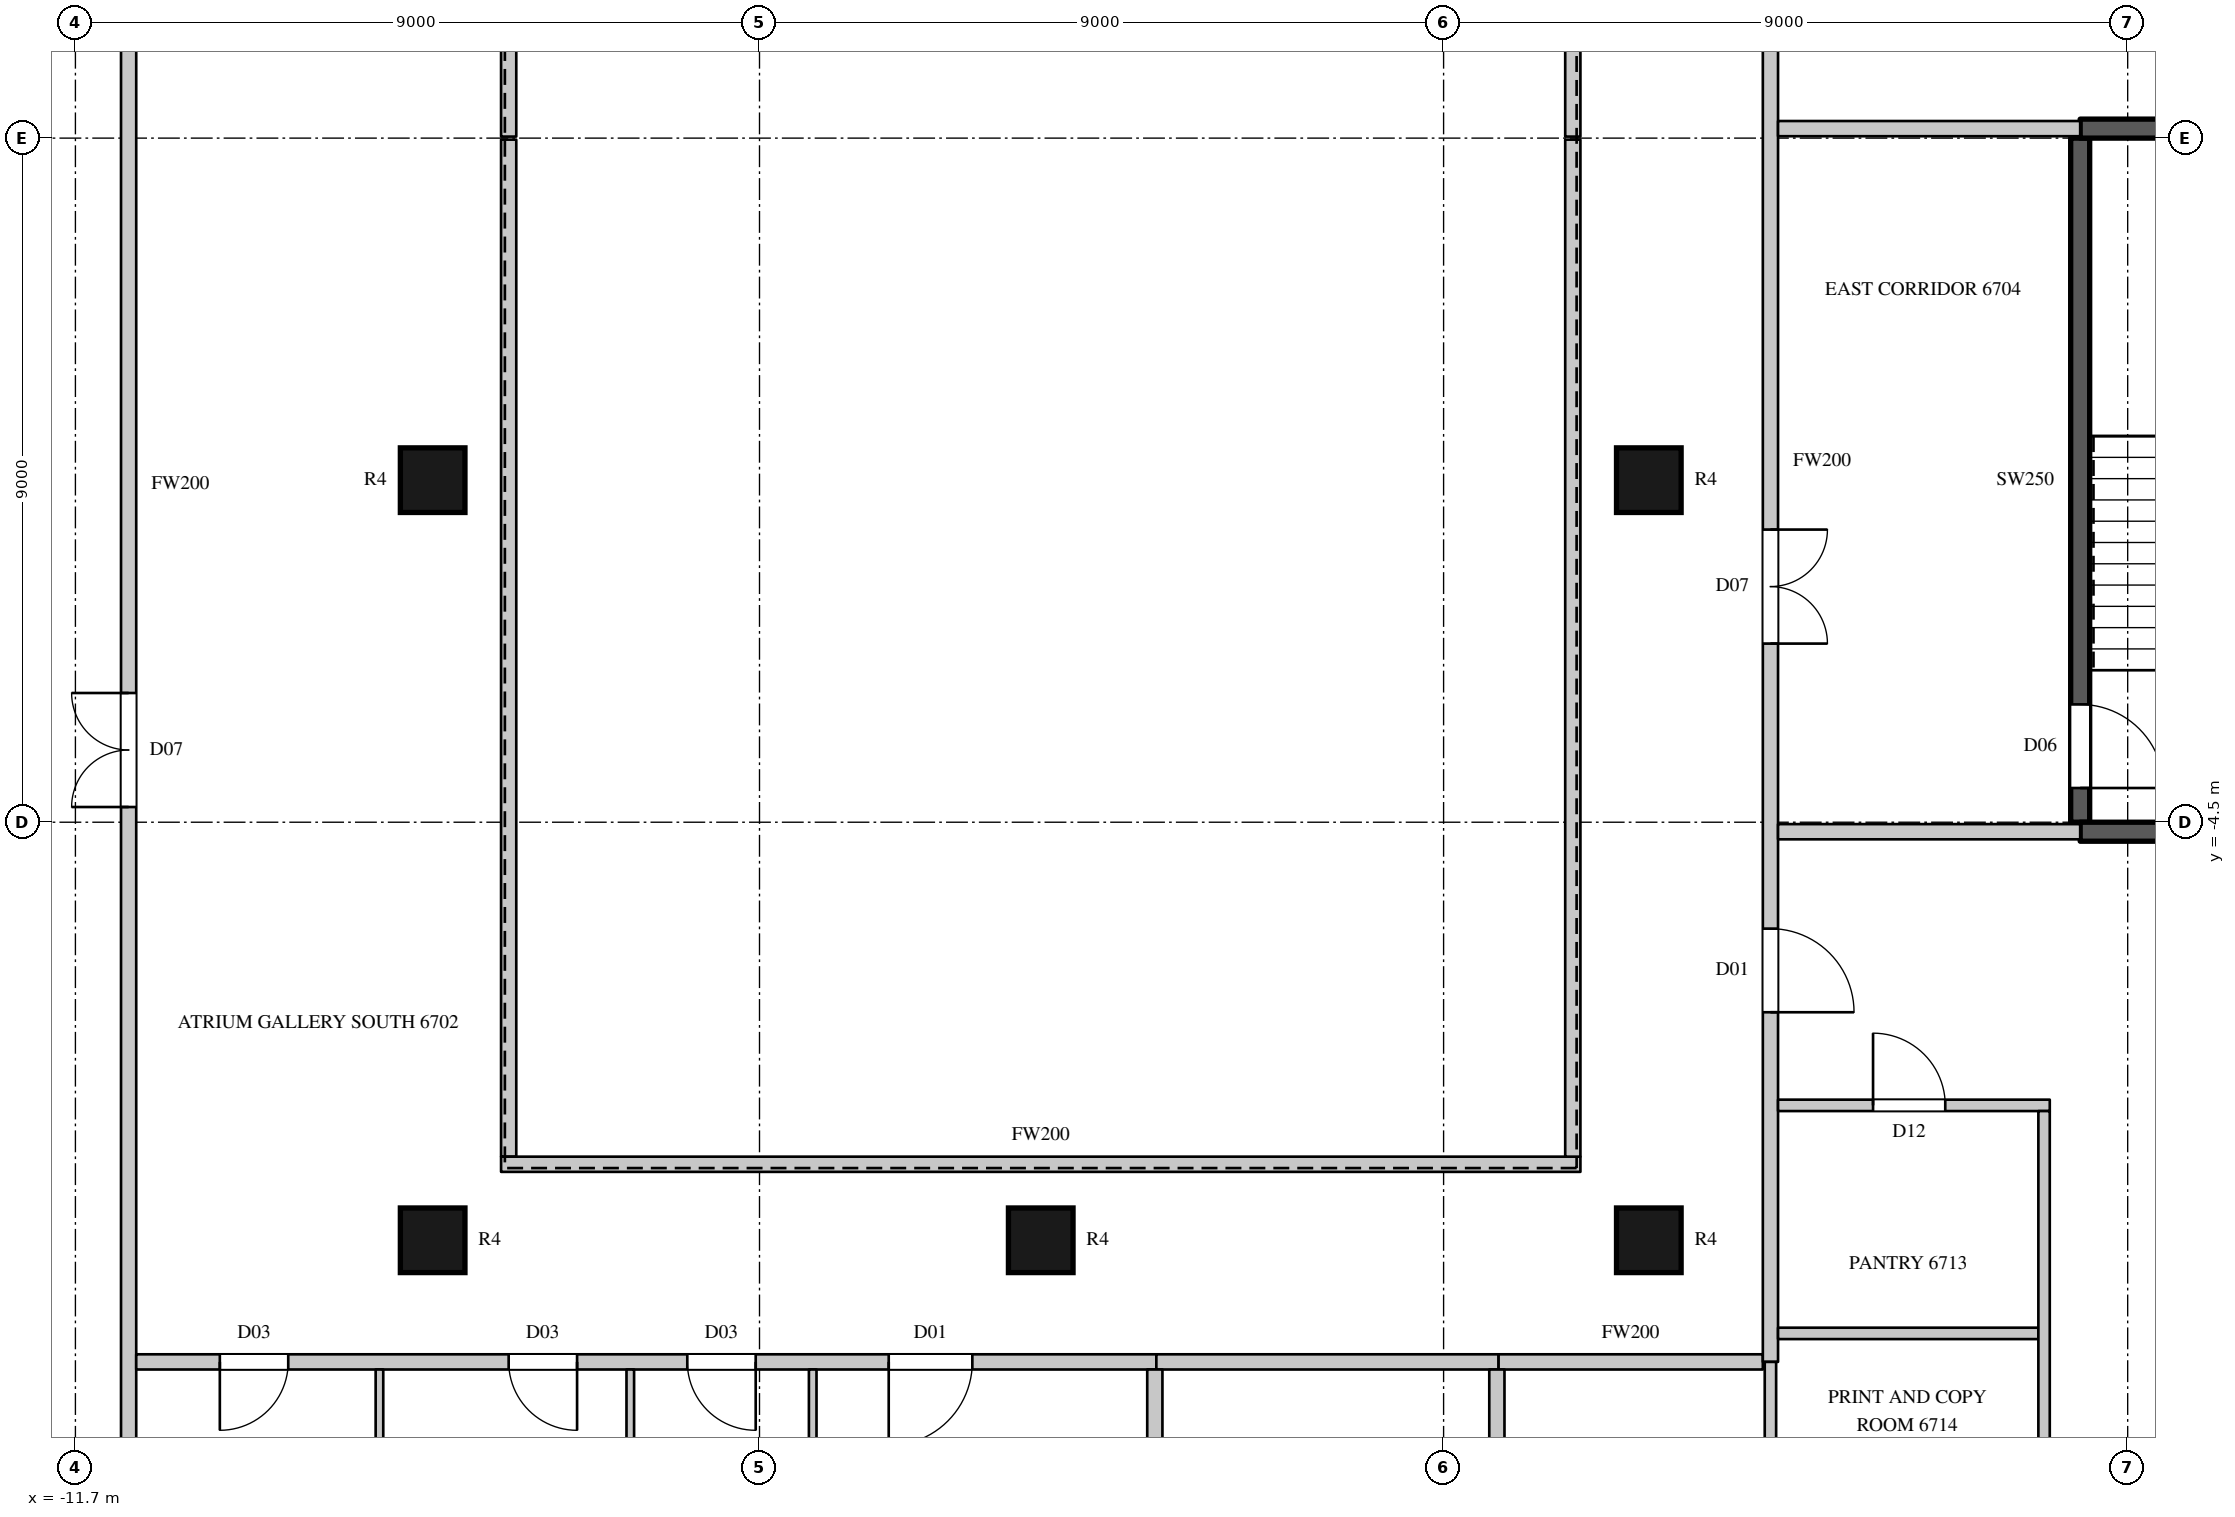
"""IFC4 building model, lengths in metres.
Left out: names, types, materials, properties, quantities, classifications, styles, units other than length and angle.
Written with IfcOpenShell. Run it as: python <this file> out.ifc"""

import sys

from ifc_helpers import new_model, si_unit, direction, frame, frame_2d, origin, origin_2d, place, context, subcontext, project, spatial, rectangle, circle, extrude, element, fill, save


model = new_model("IFC4")
c1 = context("Model", 3, precision=1e-05, world=origin(), true_north=direction((0.0, 1.0)))
c2 = subcontext(c1, "Body", "Model", "MODEL_VIEW")
j1 = project(units=[si_unit("LENGTHUNIT", "METRE"), si_unit("PLANEANGLEUNIT", "RADIAN")], contexts=[c1])
p1 = place(None, origin())
s1 = spatial("IfcSite", under=j1, at=p1, CompositionType="ELEMENT")
p2 = place(p1, origin())
s2 = spatial("IfcBuilding", under=s1, at=p2, CompositionType="ELEMENT")
p3 = place(p2, frame((0.0, 0.0, 296.7)))
s3 = spatial("IfcBuildingStorey", under=s2, at=p3, CompositionType="ELEMENT", Elevation=296.7)
for number, where, z_axis, x_axis in (
    (1, (-7.0, -10.0, 0.0), (0.0, 0.0, 1.0), (1.0, 0.0, 0.0)),
    (2, (-7.0, 0.0, 0.0), (0.0, 0.0, 1.0), (1.0, 0.0, 0.0)),
    (3, (1.0, -10.0, 0.0), (0.0, 0.0, 1.0), (1.0, 0.0, 0.0)),
    (4, (9.0, -10.0, 0.0), (0.0, 0.0, 1.0), (1.0, 0.0, 0.0)),
    (5, (9.0, 0.0, 0.0), (0.0, 0.0, 1.0), (1.0, 0.0, 0.0)),
):
    element("IfcColumn", number, at=place(p3, frame(where, z_axis=z_axis, x_axis=x_axis)), inside=s3, PredefinedType="COLUMN", context=c2, shape_type="SweptSolid", body=[
        extrude(circle(Radius=0.425, at=origin_2d()), origin(), (0.0, 0.0, 1.0), 4.1),
    ])
p4 = place(p3, frame((-11.0, -14.8, 0.0), z_axis=(0.0, 0.0, 1.0), x_axis=(0.0, 1.0, 0.0)))
e6 = element("IfcWall", 6, at=p4, inside=s3, PredefinedType="PARTITIONING", context=c2, shape_type="SweptSolid", body=[
    extrude(rectangle(XDim=29.5, YDim=0.2, at=frame_2d((14.75, 0.0))), origin(), (0.0, 0.0, 1.0), 3.8),
])
p5 = place(p4, frame((10.5, 0.0, 0.0)))
e7 = element("IfcOpeningElement", 7, at=p5, cuts=e6, PredefinedType="OPENING", context=c2, shape_type="SweptSolid", body=[
    extrude(rectangle(XDim=1.5, YDim=2.4, at=frame_2d((0.75, 1.2))), frame((0.0, 0.11, 0.0), z_axis=(0.0, -1.0, 0.0), x_axis=(1.0, 0.0, 0.0)), (0.0, 0.0, 1.0), 0.22),
])
p6 = place(p3, frame((-10.9, -11.6, 0.0), z_axis=(0.0, 0.0, 1.0), x_axis=(1.0, 0.0, 0.0)))
e8 = element("IfcWall", 8, at=p6, inside=s3, PredefinedType="PARTITIONING", context=c2, shape_type="SweptSolid", body=[
    extrude(rectangle(XDim=13.421, YDim=0.2, at=frame_2d((6.71, 0.0))), origin(), (0.0, 0.0, 1.0), 3.8),
])
p7 = place(p6, frame((1.1, 0.0, 0.0)))
e9 = element("IfcOpeningElement", 9, at=p7, cuts=e8, PredefinedType="OPENING", context=c2, shape_type="SweptSolid", body=[
    extrude(rectangle(XDim=0.9, YDim=2.2, at=frame_2d((0.45, 1.1))), frame((0.0, 0.11, 0.0), z_axis=(0.0, -1.0, 0.0), x_axis=(1.0, 0.0, 0.0)), (0.0, 0.0, 1.0), 0.22),
])
p8 = place(p6, frame((4.9, 0.0, 0.0)))
e10 = element("IfcOpeningElement", 10, at=p8, cuts=e8, PredefinedType="OPENING", context=c2, shape_type="SweptSolid", body=[
    extrude(rectangle(XDim=0.9, YDim=2.2, at=frame_2d((0.45, 1.1))), frame((0.0, 0.11, 0.0), z_axis=(0.0, -1.0, 0.0), x_axis=(1.0, 0.0, 0.0)), (0.0, 0.0, 1.0), 0.22),
])
p9 = place(p6, frame((7.25, 0.0, 0.0)))
e11 = element("IfcOpeningElement", 11, at=p9, cuts=e8, PredefinedType="OPENING", context=c2, shape_type="SweptSolid", body=[
    extrude(rectangle(XDim=0.9, YDim=2.2, at=frame_2d((0.45, 1.1))), frame((0.0, 0.11, 0.0), z_axis=(0.0, -1.0, 0.0), x_axis=(1.0, 0.0, 0.0)), (0.0, 0.0, 1.0), 0.22),
])
p10 = place(p6, frame((9.9, 0.0, 0.0)))
e12 = element("IfcOpeningElement", 12, at=p10, cuts=e8, PredefinedType="OPENING", context=c2, shape_type="SweptSolid", body=[
    extrude(rectangle(XDim=1.1, YDim=2.4, at=frame_2d((0.55, 1.2))), frame((0.0, 0.11, 0.0), z_axis=(0.0, -1.0, 0.0), x_axis=(1.0, 0.0, 0.0)), (0.0, 0.0, 1.0), 0.22),
])
p11 = place(p3, frame((-6.0, -8.9, 0.0), z_axis=(0.0, 0.0, 1.0), x_axis=(0.0, 1.0, 0.0)))
e13 = element("IfcWall", 13, at=p11, inside=s3, PredefinedType="PARTITIONING", context=c2, shape_type="SweptSolid", body=[
    extrude(rectangle(XDim=13.38, YDim=0.2, at=frame_2d((6.69, 0.0))), origin(), (0.0, 0.0, 1.0), 3.8),
])
p12 = place(p3, frame((-6.1, -9.0, 0.0), z_axis=(0.0, 0.0, 1.0), x_axis=(1.0, 0.0, 0.0)))
e14 = element("IfcWall", 14, at=p12, inside=s3, PredefinedType="PARTITIONING", context=c2, shape_type="SweptSolid", body=[
    extrude(rectangle(XDim=14.2, YDim=0.2, at=frame_2d((7.1, 0.0))), origin(), (0.0, 0.0, 1.0), 3.8),
])
p13 = place(p3, frame((-6.0, 4.52, 0.0), z_axis=(0.0, 0.0, 1.0), x_axis=(0.0, 1.0, 0.0)))
e15 = element("IfcWall", 15, at=p13, inside=s3, PredefinedType="PARTITIONING", context=c2, shape_type="SweptSolid", body=[
    extrude(rectangle(XDim=4.38, YDim=0.2, at=frame_2d((2.19, 0.0))), origin(), (0.0, 0.0, 1.0), 3.8),
])
p14 = place(p3, frame((7.021, -11.6, 0.0), z_axis=(0.0, 0.0, 1.0), x_axis=(1.0, 0.0, 0.0)))
e16 = element("IfcWall", 16, at=p14, inside=s3, PredefinedType="PARTITIONING", context=c2, shape_type="SweptSolid", body=[
    extrude(rectangle(XDim=3.479, YDim=0.2, at=frame_2d((1.74, 0.0))), origin(), (0.0, 0.0, 1.0), 3.8),
])
p15 = place(p3, frame((8.0, -8.9, 0.0), z_axis=(0.0, 0.0, 1.0), x_axis=(0.0, 1.0, 0.0)))
e17 = element("IfcWall", 17, at=p15, inside=s3, PredefinedType="PARTITIONING", context=c2, shape_type="SweptSolid", body=[
    extrude(rectangle(XDim=13.38, YDim=0.2, at=frame_2d((6.69, 0.0))), origin(), (0.0, 0.0, 1.0), 3.8),
])
p16 = place(p3, frame((8.0, 4.52, 0.0), z_axis=(0.0, 0.0, 1.0), x_axis=(0.0, 1.0, 0.0)))
e18 = element("IfcWall", 18, at=p16, inside=s3, PredefinedType="PARTITIONING", context=c2, shape_type="SweptSolid", body=[
    extrude(rectangle(XDim=4.38, YDim=0.2, at=frame_2d((2.19, 0.0))), origin(), (0.0, 0.0, 1.0), 3.8),
])
p17 = place(p3, frame((10.6, -11.6, 0.0), z_axis=(0.0, 0.0, 1.0), x_axis=(0.0, 1.0, 0.0)))
e19 = element("IfcWall", 19, at=p17, inside=s3, PredefinedType="PARTITIONING", context=c2, shape_type="SweptSolid", body=[
    extrude(rectangle(XDim=23.7, YDim=0.2, at=frame_2d((11.85, 0.0))), origin(), (0.0, 0.0, 1.0), 3.8),
])
p18 = place(p17, frame((9.45, 0.0, 0.0)))
e20 = element("IfcOpeningElement", 20, at=p18, cuts=e19, PredefinedType="OPENING", context=c2, shape_type="SweptSolid", body=[
    extrude(rectangle(XDim=1.5, YDim=2.4, at=frame_2d((0.75, 1.2))), frame((0.0, 0.11, 0.0), z_axis=(0.0, -1.0, 0.0), x_axis=(1.0, 0.0, 0.0)), (0.0, 0.0, 1.0), 0.22),
])
p19 = place(p17, frame((19.45, 0.0, 0.0)))
e21 = element("IfcOpeningElement", 21, at=p19, cuts=e19, PredefinedType="OPENING", context=c2, shape_type="SweptSolid", body=[
    extrude(rectangle(XDim=1.1, YDim=2.4, at=frame_2d((0.55, 1.2))), frame((0.0, 0.11, 0.0), z_axis=(0.0, -1.0, 0.0), x_axis=(1.0, 0.0, 0.0)), (0.0, 0.0, 1.0), 0.22),
])
p20 = place(p17, frame((4.6, 0.0, 0.0)))
e22 = element("IfcOpeningElement", 22, at=p20, cuts=e19, PredefinedType="OPENING", context=c2, shape_type="SweptSolid", body=[
    extrude(rectangle(XDim=1.1, YDim=2.4, at=frame_2d((0.55, 1.2))), frame((0.0, 0.11, 0.0), z_axis=(0.0, -1.0, 0.0), x_axis=(1.0, 0.0, 0.0)), (0.0, 0.0, 1.0), 0.22),
])
for number, where, z_axis, x_axis in (
    (23, (10.7, -4.625, 0.0), (0.0, 0.0, 1.0), (1.0, 0.0, 0.0)),
    (24, (10.7, 4.625, 0.0), (0.0, 0.0, 1.0), (1.0, 0.0, 0.0)),
):
    element("IfcWall", number, at=place(p3, frame(where, z_axis=z_axis, x_axis=x_axis)), inside=s3, PredefinedType="PARTITIONING", context=c2, shape_type="SweptSolid", body=[
        extrude(rectangle(XDim=3.975, YDim=0.2, at=frame_2d((1.988, 0.0))), origin(), (0.0, 0.0, 1.0), 3.8),
    ])
p21 = place(p3, frame((10.6, -20.864, 0.0), z_axis=(0.0, 0.0, 1.0), x_axis=(0.0, 1.0, 0.0)))
e25 = element("IfcWall", 25, at=p21, inside=s3, PredefinedType="PARTITIONING", context=c2, shape_type="SweptSolid", body=[
    extrude(rectangle(XDim=9.264, YDim=0.15, at=frame_2d((4.632, 0.0))), origin(), (0.0, 0.0, 1.0), 3.8),
])
p22 = place(p3, frame((10.7, -11.225, 0.0), z_axis=(0.0, 0.0, 1.0), x_axis=(1.0, 0.0, 0.0)))
e26 = element("IfcWall", 26, at=p22, inside=s3, PredefinedType="PARTITIONING", context=c2, shape_type="SweptSolid", body=[
    extrude(rectangle(XDim=3.425, YDim=0.15, at=frame_2d((1.712, 0.0))), origin(), (0.0, 0.0, 1.0), 3.8),
])
p23 = place(p3, frame((10.7, -8.225, 0.0), z_axis=(0.0, 0.0, 1.0), x_axis=(1.0, 0.0, 0.0)))
e27 = element("IfcWall", 27, at=p23, inside=s3, PredefinedType="PARTITIONING", context=c2, shape_type="SweptSolid", body=[
    extrude(rectangle(XDim=3.575, YDim=0.15, at=frame_2d((1.788, 0.0))), origin(), (0.0, 0.0, 1.0), 3.15),
])
p24 = place(p23, frame((1.25, 0.0, 0.0)))
e28 = element("IfcOpeningElement", 28, at=p24, cuts=e27, PredefinedType="OPENING", context=c2, shape_type="SweptSolid", body=[
    extrude(rectangle(XDim=0.95, YDim=2.2, at=frame_2d((0.475, 1.1))), frame((0.0, 0.085, 0.0), z_axis=(0.0, -1.0, 0.0), x_axis=(1.0, 0.0, 0.0)), (0.0, 0.0, 1.0), 0.17),
])
p25 = place(p3, frame((14.2, -14.15, 0.0), z_axis=(0.0, 0.0, 1.0), x_axis=(0.0, 1.0, 0.0)))
e29 = element("IfcWall", 29, at=p25, inside=s3, PredefinedType="PARTITIONING", context=c2, shape_type="SweptSolid", body=[
    extrude(rectangle(XDim=5.85, YDim=0.15, at=frame_2d((2.925, 0.0))), origin(), (0.0, 0.0, 1.0), 3.8),
])
p26 = place(p3, frame((2.521, -11.6, 0.0), z_axis=(0.0, 0.0, 1.0), x_axis=(1.0, 0.0, 0.0)))
e30 = element("IfcWall", 30, at=p26, inside=s3, PredefinedType="PARTITIONING", context=c2, shape_type="SweptSolid", body=[
    extrude(rectangle(XDim=4.5, YDim=0.2, at=frame_2d((2.25, 0.0))), origin(), (0.0, 0.0, 1.0), 3.8),
])
p27 = place(p3, frame((2.501, -15.7, 0.0), z_axis=(0.0, 0.0, 1.0), x_axis=(0.0, 1.0, 0.0)))
e31 = element("IfcWall", 31, at=p27, inside=s3, PredefinedType="PARTITIONING", context=c2, shape_type="SweptSolid", body=[
    extrude(rectangle(XDim=4.0, YDim=0.2, at=frame_2d((2.0, 0.0))), origin(), (0.0, 0.0, 1.0), 3.8),
])
p28 = place(p27, frame((0.15, 0.0, 0.0)))
e32 = element("IfcOpeningElement", 32, at=p28, cuts=e31, PredefinedType="OPENING", context=c2, shape_type="SweptSolid", body=[
    extrude(rectangle(XDim=0.9, YDim=2.2, at=frame_2d((0.45, 1.1))), frame((0.0, 0.11, 0.0), z_axis=(0.0, -1.0, 0.0), x_axis=(1.0, 0.0, 0.0)), (0.0, 0.0, 1.0), 0.22),
])
p29 = place(p3, frame((7.001, -15.7, 0.0), z_axis=(0.0, 0.0, 1.0), x_axis=(0.0, 1.0, 0.0)))
e33 = element("IfcWall", 33, at=p29, inside=s3, PredefinedType="PARTITIONING", context=c2, shape_type="SweptSolid", body=[
    extrude(rectangle(XDim=4.0, YDim=0.2, at=frame_2d((2.0, 0.0))), origin(), (0.0, 0.0, 1.0), 3.8),
])
p30 = place(p3, frame((14.675, -4.5, 0.0), z_axis=(0.0, 0.0, 1.0), x_axis=(0.0, 1.0, 0.0)))
e34 = element("IfcWall", 34, at=p30, inside=s3, PredefinedType="SHEAR", context=c2, shape_type="SweptSolid", body=[
    extrude(rectangle(XDim=9.0, YDim=0.25, at=frame_2d((4.5, 0.0))), origin(), (0.0, 0.0, 1.0), 3.8),
])
p31 = place(p30, frame((0.45, 0.0, 0.0)))
e35 = element("IfcOpeningElement", 35, at=p31, cuts=e34, PredefinedType="OPENING", context=c2, shape_type="SweptSolid", body=[
    extrude(rectangle(XDim=1.1, YDim=2.2, at=frame_2d((0.55, 1.1))), frame((0.0, 0.135, 0.0), z_axis=(0.0, -1.0, 0.0), x_axis=(1.0, 0.0, 0.0)), (0.0, 0.0, 1.0), 0.27),
])
for number, where, z_axis, x_axis in (
    (36, (14.675, -4.625, 0.0), (0.0, 0.0, 1.0), (1.0, 0.0, 0.0)),
    (37, (14.675, 4.625, 0.0), (0.0, 0.0, 1.0), (1.0, 0.0, 0.0)),
):
    element("IfcWall", number, at=place(p3, frame(where, z_axis=z_axis, x_axis=x_axis)), inside=s3, PredefinedType="SHEAR", context=c2, shape_type="SweptSolid", body=[
        extrude(rectangle(XDim=4.45, YDim=0.25, at=frame_2d((2.225, 0.0))), origin(), (0.0, 0.0, 1.0), 3.8),
    ])
for number, where, z_axis, x_axis in (
    (38, (-7.7, -24.04, 0.0), (0.0, 0.0, 1.0), (0.0, 1.0, 0.0)),
    (39, (-4.4, -24.04, 0.0), (0.0, 0.0, 1.0), (0.0, 1.0, 0.0)),
):
    element("IfcWall", number, at=place(p3, frame(where, z_axis=z_axis, x_axis=x_axis)), inside=s3, PredefinedType="PARTITIONING", context=c2, shape_type="SweptSolid", body=[
        extrude(rectangle(XDim=12.34, YDim=0.1, at=frame_2d((6.17, 0.0))), origin(), (0.0, 0.0, 1.0), 3.8),
    ])
p32 = place(p3, frame((-2.0, -23.447, 0.0), z_axis=(0.0, 0.0, 1.0), x_axis=(0.0, 1.0, 0.0)))
e40 = element("IfcWall", 40, at=p32, inside=s3, PredefinedType="PARTITIONING", context=c2, shape_type="SweptSolid", body=[
    extrude(rectangle(XDim=11.747, YDim=0.1, at=frame_2d((5.874, 0.0))), origin(), (0.0, 0.0, 1.0), 3.8),
])
p33 = place(p5, origin())
e41 = element("IfcDoor", 41, at=p33, inside=s3, OperationType="DOUBLE_DOOR_SINGLE_SWING", PredefinedType="DOOR", context=c2, shape_type="SweptSolid", body=[
    extrude(rectangle(XDim=1.5, YDim=2.4, at=frame_2d((0.75, 1.2))), frame((0.0, 0.025, 0.0), z_axis=(0.0, -1.0, 0.0), x_axis=(1.0, 0.0, 0.0)), (0.0, 0.0, 1.0), 0.05),
])
fill(e7, e41)
p34 = place(p18, origin())
e42 = element("IfcDoor", 42, at=p34, inside=s3, OperationType="DOUBLE_DOOR_SINGLE_SWING", PredefinedType="DOOR", context=c2, shape_type="SweptSolid", body=[
    extrude(rectangle(XDim=1.5, YDim=2.4, at=frame_2d((0.75, 1.2))), frame((0.0, 0.025, 0.0), z_axis=(0.0, -1.0, 0.0), x_axis=(1.0, 0.0, 0.0)), (0.0, 0.0, 1.0), 0.05),
])
fill(e20, e42)
p35 = place(p7, origin())
e43 = element("IfcDoor", 43, at=p35, inside=s3, OperationType="SINGLE_SWING_RIGHT", PredefinedType="DOOR", context=c2, shape_type="SweptSolid", body=[
    extrude(rectangle(XDim=0.9, YDim=2.2, at=frame_2d((0.45, 1.1))), frame((0.0, 0.025, 0.0), z_axis=(0.0, -1.0, 0.0), x_axis=(1.0, 0.0, 0.0)), (0.0, 0.0, 1.0), 0.05),
])
fill(e9, e43)
p36 = place(p8, origin())
e44 = element("IfcDoor", 44, at=p36, inside=s3, OperationType="SINGLE_SWING_LEFT", PredefinedType="DOOR", context=c2, shape_type="SweptSolid", body=[
    extrude(rectangle(XDim=0.9, YDim=2.2, at=frame_2d((0.45, 1.1))), frame((0.0, 0.025, 0.0), z_axis=(0.0, -1.0, 0.0), x_axis=(1.0, 0.0, 0.0)), (0.0, 0.0, 1.0), 0.05),
])
fill(e10, e44)
p37 = place(p9, origin())
e45 = element("IfcDoor", 45, at=p37, inside=s3, OperationType="SINGLE_SWING_LEFT", PredefinedType="DOOR", context=c2, shape_type="SweptSolid", body=[
    extrude(rectangle(XDim=0.9, YDim=2.2, at=frame_2d((0.45, 1.1))), frame((0.0, 0.025, 0.0), z_axis=(0.0, -1.0, 0.0), x_axis=(1.0, 0.0, 0.0)), (0.0, 0.0, 1.0), 0.05),
])
fill(e11, e45)
p38 = place(p10, origin())
e46 = element("IfcDoor", 46, at=p38, inside=s3, OperationType="SINGLE_SWING_RIGHT", PredefinedType="DOOR", context=c2, shape_type="SweptSolid", body=[
    extrude(rectangle(XDim=1.1, YDim=2.4, at=frame_2d((0.55, 1.2))), frame((0.0, 0.025, 0.0), z_axis=(0.0, -1.0, 0.0), x_axis=(1.0, 0.0, 0.0)), (0.0, 0.0, 1.0), 0.05),
])
fill(e12, e46)
p39 = place(p20, origin())
e47 = element("IfcDoor", 47, at=p39, inside=s3, OperationType="SINGLE_SWING_RIGHT", PredefinedType="DOOR", context=c2, shape_type="SweptSolid", body=[
    extrude(rectangle(XDim=1.1, YDim=2.4, at=frame_2d((0.55, 1.2))), frame((0.0, 0.025, 0.0), z_axis=(0.0, -1.0, 0.0), x_axis=(1.0, 0.0, 0.0)), (0.0, 0.0, 1.0), 0.05),
])
fill(e22, e47)
p40 = place(p24, origin())
e48 = element("IfcDoor", 48, at=p40, inside=s3, OperationType="SINGLE_SWING_LEFT", PredefinedType="DOOR", context=c2, shape_type="SweptSolid", body=[
    extrude(rectangle(XDim=0.95, YDim=2.2, at=frame_2d((0.475, 1.1))), frame((0.0, 0.025, 0.0), z_axis=(0.0, -1.0, 0.0), x_axis=(1.0, 0.0, 0.0)), (0.0, 0.0, 1.0), 0.05),
])
fill(e28, e48)
p41 = place(p31, origin())
e49 = element("IfcDoor", 49, at=p41, inside=s3, OperationType="SINGLE_SWING_RIGHT", PredefinedType="DOOR", context=c2, shape_type="SweptSolid", body=[
    extrude(rectangle(XDim=1.1, YDim=2.2, at=frame_2d((0.55, 1.1))), frame((0.0, 0.025, 0.0), z_axis=(0.0, -1.0, 0.0), x_axis=(1.0, 0.0, 0.0)), (0.0, 0.0, 1.0), 0.05),
])
fill(e35, e49)
save(model, sys.argv[1])
